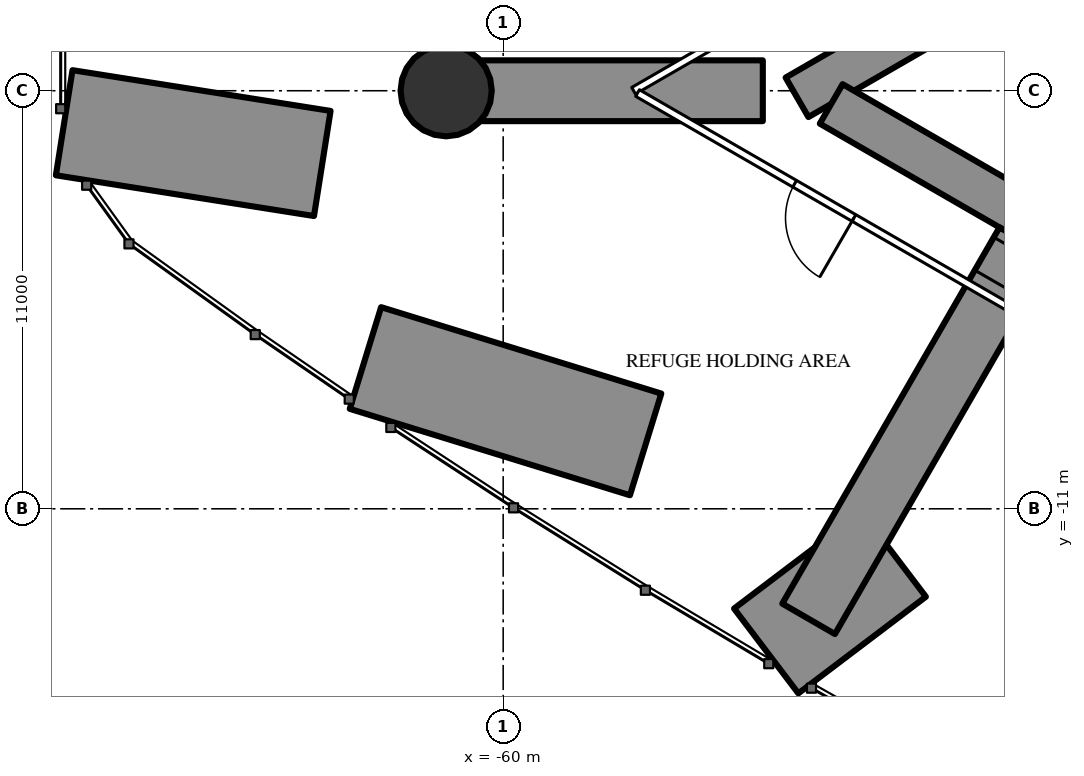
"""IFC4 building model, lengths in metres.
Left out: names, types, materials, properties, quantities, classifications, styles, units other than length and angle.
Written with IfcOpenShell. Run it as: python <this file> out.ifc"""

import sys

from ifc_helpers import new_model, si_unit, direction, frame, frame_2d, origin, origin_2d, place, context, subcontext, project, spatial, rectangle, circle, extrude, element, fill, save


model = new_model("IFC4")
c1 = context("Model", 3, precision=1e-05, world=origin(), true_north=direction((0.0, 1.0)))
c2 = subcontext(c1, "Body", "Model", "MODEL_VIEW")
j1 = project(units=[si_unit("LENGTHUNIT", "METRE"), si_unit("PLANEANGLEUNIT", "RADIAN")], contexts=[c1])
p1 = place(None, origin())
s1 = spatial("IfcSite", under=j1, at=p1, CompositionType="ELEMENT")
p2 = place(p1, origin())
s2 = spatial("IfcBuilding", under=s1, at=p2, CompositionType="ELEMENT")
p3 = place(p2, frame((0.0, 0.0, 146.7)))
s3 = spatial("IfcBuildingStorey", under=s2, at=p3, CompositionType="ELEMENT", Elevation=146.7)
p4 = place(p3, frame((-71.551, -0.842, 0.0), z_axis=(0.0, 0.0, 1.0), x_axis=(0.987774767093, -0.155887810603, 0.0)))
e1 = element("IfcWall", 1, at=p4, inside=s3, PredefinedType="SHEAR", context=c2, shape_type="SweptSolid", body=[
    extrude(rectangle(XDim=6.875, YDim=2.8, at=frame_2d((3.438, 0.0))), origin(), (0.0, 0.0, 1.0), 6.0),
])
p5 = place(p3, frame((-63.625, -7.032, 0.0), z_axis=(0.0, 0.0, 1.0), x_axis=(0.955592035737, -0.29469282522, 0.0)))
e2 = element("IfcWall", 2, at=p5, inside=s3, PredefinedType="SHEAR", context=c2, shape_type="SweptSolid", body=[
    extrude(rectangle(XDim=7.715, YDim=2.8, at=frame_2d((3.858, 0.0))), origin(), (0.0, 0.0, 1.0), 6.0),
])
p6 = place(p3, frame((-53.079, -14.74, 0.0), z_axis=(0.0, 0.0, 1.0), x_axis=(0.797075233676, 0.603880014457, 0.0)))
e3 = element("IfcWall", 3, at=p6, inside=s3, PredefinedType="SHEAR", context=c2, shape_type="SweptSolid", body=[
    extrude(rectangle(XDim=4.211, YDim=2.8, at=frame_2d((2.105, 0.0))), origin(), (0.0, 0.0, 1.0), 6.0),
])
p7 = place(p3, frame((-61.5, 0.0, 0.0), z_axis=(0.0, 0.0, 1.0), x_axis=(1.0, 0.0, 0.0)))
e4 = element("IfcColumn", 4, at=p7, inside=s3, PredefinedType="COLUMN", context=c2, shape_type="SweptSolid", body=[
    extrude(circle(Radius=1.2, at=origin_2d()), origin(), (0.0, 0.0, 1.0), 6.0),
])
p8 = place(p3, frame((-27.2, 14.3, 0.0), z_axis=(0.0, 0.0, 1.0), x_axis=(-0.866026593062, -0.499997940104, 0.0)))
e5 = element("IfcWall", 5, at=p8, inside=s3, PredefinedType="SHEAR", context=c2, shape_type="SweptSolid", body=[
    extrude(rectangle(XDim=28.946, YDim=1.2, at=frame_2d((14.473, 0.0))), origin(), (0.0, 0.0, 1.0), 6.0),
])
p9 = place(p8, frame((4.6, 0.0, 0.0)))
e6 = element("IfcOpeningElement", 6, at=p9, cuts=e5, PredefinedType="OPENING", context=c2, shape_type="SweptSolid", body=[
    extrude(rectangle(XDim=1.0, YDim=2.2, at=frame_2d((0.5, 1.1))), frame((0.0, 0.61, 0.0), z_axis=(0.0, -1.0, 0.0), x_axis=(1.0, 0.0, 0.0)), (0.0, 0.0, 1.0), 1.22),
])
p10 = place(p8, frame((13.568, 0.0, 0.0)))
e7 = element("IfcOpeningElement", 7, at=p10, cuts=e5, PredefinedType="OPENING", context=c2, shape_type="SweptSolid", body=[
    extrude(rectangle(XDim=1.8, YDim=2.2, at=frame_2d((0.9, 1.1))), frame((0.0, 0.61, 0.0), z_axis=(0.0, -1.0, 0.0), x_axis=(1.0, 0.0, 0.0)), (0.0, 0.0, 1.0), 1.22),
])
p11 = place(p3, frame((-27.2, -14.3, 0.0), z_axis=(0.0, 0.0, 1.0), x_axis=(-0.866024021859, 0.500002393557, 0.0)))
e8 = element("IfcWall", 8, at=p11, inside=s3, PredefinedType="SHEAR", context=c2, shape_type="SweptSolid", body=[
    extrude(rectangle(XDim=27.907, YDim=1.2, at=frame_2d((13.954, 0.0))), origin(), (0.0, 0.0, 1.0), 6.0),
])
p12 = place(p11, frame((4.6, 0.0, 0.0)))
e9 = element("IfcOpeningElement", 9, at=p12, cuts=e8, PredefinedType="OPENING", context=c2, shape_type="SweptSolid", body=[
    extrude(rectangle(XDim=1.0, YDim=2.2, at=frame_2d((0.5, 1.1))), frame((0.0, 0.61, 0.0), z_axis=(0.0, -1.0, 0.0), x_axis=(1.0, 0.0, 0.0)), (0.0, 0.0, 1.0), 1.22),
])
p13 = place(p11, frame((13.568, 0.0, 0.0)))
e10 = element("IfcOpeningElement", 10, at=p13, cuts=e8, PredefinedType="OPENING", context=c2, shape_type="SweptSolid", body=[
    extrude(rectangle(XDim=1.8, YDim=2.2, at=frame_2d((0.9, 1.1))), frame((0.0, 0.61, 0.0), z_axis=(0.0, -1.0, 0.0), x_axis=(1.0, 0.0, 0.0)), (0.0, 0.0, 1.0), 1.22),
])
p14 = place(p3, frame((-53.168, 0.0, 0.0), z_axis=(0.0, 0.0, 1.0), x_axis=(-1.0, 0.0, 0.0)))
e11 = element("IfcWall", 11, at=p14, inside=s3, PredefinedType="SHEAR", context=c2, shape_type="SweptSolid", body=[
    extrude(rectangle(XDim=8.332, YDim=1.6, at=frame_2d((4.166, 0.0))), origin(), (0.0, 0.0, 1.0), 6.0),
])
p15 = place(p3, frame((-46.248, -3.996, 0.0), z_axis=(0.0, 0.0, 1.0), x_axis=(-0.499993613132, -0.866029091213, 0.0)))
e12 = element("IfcWall", 12, at=p15, inside=s3, PredefinedType="SHEAR", context=c2, shape_type="SweptSolid", body=[
    extrude(rectangle(XDim=11.431, YDim=1.6, at=frame_2d((5.715, 0.0))), origin(), (0.0, 0.0, 1.0), 6.0),
])
p16 = place(p15, frame((0.3, 0.0, 0.0)))
e13 = element("IfcOpeningElement", 13, at=p16, cuts=e12, PredefinedType="OPENING", context=c2, shape_type="SweptSolid", body=[
    extrude(rectangle(XDim=1.0, YDim=2.2, at=frame_2d((0.5, 1.1))), frame((0.0, 0.81, 0.0), z_axis=(0.0, -1.0, 0.0), x_axis=(1.0, 0.0, 0.0)), (0.0, 0.0, 1.0), 1.62),
])
p17 = place(p3, frame((-27.572, 16.741, 0.0), z_axis=(0.0, 0.0, 1.0), x_axis=(-0.866026395587, -0.499998282143, 0.0)))
e14 = element("IfcWall", 14, at=p17, inside=s3, PredefinedType="PARTITIONING", context=c2, shape_type="SweptSolid", body=[
    extrude(rectangle(XDim=33.482, YDim=0.2, at=frame_2d((16.741, 0.0))), origin(), (0.0, 0.0, 1.0), 5.75),
])
p18 = place(p17, frame((4.354, 0.0, 0.0)))
e15 = element("IfcOpeningElement", 15, at=p18, cuts=e14, PredefinedType="OPENING", context=c2, shape_type="SweptSolid", body=[
    extrude(rectangle(XDim=1.8, YDim=2.2, at=frame_2d((0.9, 1.1))), frame((0.0, 0.11, 0.0), z_axis=(0.0, -1.0, 0.0), x_axis=(1.0, 0.0, 0.0)), (0.0, 0.0, 1.0), 0.22),
])
p19 = place(p17, frame((14.977, 0.0, 0.0)))
e16 = element("IfcOpeningElement", 16, at=p19, cuts=e14, PredefinedType="OPENING", context=c2, shape_type="SweptSolid", body=[
    extrude(rectangle(XDim=2.0, YDim=2.4, at=frame_2d((1.0, 1.2))), frame((0.0, 0.11, 0.0), z_axis=(0.0, -1.0, 0.0), x_axis=(1.0, 0.0, 0.0)), (0.0, 0.0, 1.0), 0.22),
])
p20 = place(p17, frame((26.788, 0.0, 0.0)))
e17 = element("IfcOpeningElement", 17, at=p20, cuts=e14, PredefinedType="OPENING", context=c2, shape_type="SweptSolid", body=[
    extrude(rectangle(XDim=1.8, YDim=2.2, at=frame_2d((0.9, 1.1))), frame((0.0, 0.11, 0.0), z_axis=(0.0, -1.0, 0.0), x_axis=(1.0, 0.0, 0.0)), (0.0, 0.0, 1.0), 0.22),
])
p21 = place(p3, frame((-36.92, -11.344, 0.0), z_axis=(0.0, 0.0, 1.0), x_axis=(-0.866028313256, 0.499994960614, 0.0)))
e18 = element("IfcWall", 18, at=p21, inside=s3, PredefinedType="PARTITIONING", context=c2, shape_type="SweptSolid", body=[
    extrude(rectangle(XDim=22.568, YDim=0.2, at=frame_2d((11.284, 0.0))), origin(), (0.0, 0.0, 1.0), 5.75),
])
p22 = place(p21, frame((15.994, 0.0, 0.0)))
e19 = element("IfcOpeningElement", 19, at=p22, cuts=e18, PredefinedType="OPENING", context=c2, shape_type="SweptSolid", body=[
    extrude(rectangle(XDim=1.8, YDim=2.2, at=frame_2d((0.9, 1.1))), frame((0.0, 0.11, 0.0), z_axis=(0.0, -1.0, 0.0), x_axis=(1.0, 0.0, 0.0)), (0.0, 0.0, 1.0), 0.22),
])
p23 = place(p21, frame((4.651, 0.0, 0.0)))
e20 = element("IfcOpeningElement", 20, at=p23, cuts=e18, PredefinedType="OPENING", context=c2, shape_type="SweptSolid", body=[
    extrude(rectangle(XDim=1.8, YDim=2.2, at=frame_2d((0.9, 1.1))), frame((0.0, 0.11, 0.0), z_axis=(0.0, -1.0, 0.0), x_axis=(1.0, 0.0, 0.0)), (0.0, 0.0, 1.0), 0.22),
])
p24 = place(p16, origin())
e21 = element("IfcDoor", 21, at=p24, inside=s3, OperationType="SINGLE_SWING_LEFT", PredefinedType="DOOR", context=c2, shape_type="SweptSolid", body=[
    extrude(rectangle(XDim=1.0, YDim=2.2, at=frame_2d((0.5, 1.1))), frame((0.0, 0.025, 0.0), z_axis=(0.0, -1.0, 0.0), x_axis=(1.0, 0.0, 0.0)), (0.0, 0.0, 1.0), 0.05),
])
fill(e13, e21)
p25 = place(p22, origin())
e22 = element("IfcDoor", 22, at=p25, inside=s3, OperationType="DOUBLE_DOOR_SINGLE_SWING", PredefinedType="DOOR", context=c2, shape_type="SweptSolid", body=[
    extrude(rectangle(XDim=1.8, YDim=2.2, at=frame_2d((0.9, 1.1))), frame((0.0, 0.025, 0.0), z_axis=(0.0, -1.0, 0.0), x_axis=(1.0, 0.0, 0.0)), (0.0, 0.0, 1.0), 0.05),
])
fill(e19, e22)
save(model, sys.argv[1])
